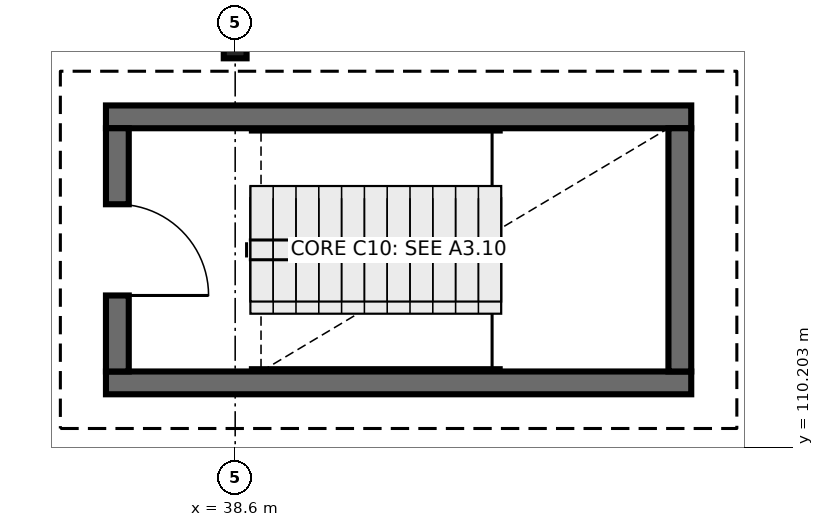
"""IFC4 building model, lengths in metres.
Left out: names, types, materials, properties, quantities, classifications, styles, units other than length and angle.
Written with IfcOpenShell. Run it as: python <this file> out.ifc"""

import sys

from ifc_helpers import new_model, si_unit, direction, frame, frame_2d, origin, origin_2d, place, context, subcontext, project, spatial, rectangle, i_section, extrude, element, fill, save


model = new_model("IFC4")
c1 = context("Model", 3, precision=1e-05, world=origin(), true_north=direction((0.0, 1.0)))
c2 = subcontext(c1, "Body", "Model", "MODEL_VIEW")
j1 = project(units=[si_unit("LENGTHUNIT", "METRE"), si_unit("PLANEANGLEUNIT", "RADIAN")], contexts=[c1])
p1 = place(None, origin())
s1 = spatial("IfcSite", under=j1, at=p1, CompositionType="ELEMENT")
p2 = place(p1, origin())
s2 = spatial("IfcBuilding", under=s1, at=p2, CompositionType="ELEMENT")
p3 = place(p2, frame((0.0, 0.0, 13.8)))
s3 = spatial("IfcBuildingStorey", under=s2, at=p3, CompositionType="ELEMENT", Elevation=13.8)
p4 = place(p3, frame((38.6, 115.5, 0.0), z_axis=(0.0, 0.0, 1.0), x_axis=(1.0, 0.0, 0.0)))
e1 = element("IfcColumn", 1, at=p4, inside=s3, PredefinedType="COLUMN", context=c2, shape_type="SweptSolid", body=[
    extrude(i_section(OverallWidth=0.3, OverallDepth=0.36, WebThickness=0.012, FlangeThickness=0.022, FilletRadius=0.027, at=origin_2d()), origin(), (0.0, 0.0, 1.0), 4.5),
])
for number, where, z_axis, x_axis in (
    (2, (36.9, 111.05, 0.0), (0.0, 0.0, 1.0), (1.0, 0.0, 0.0)),
    (3, (44.6, 114.55, 0.0), (0.0, 0.0, 1.0), (-1.0, 0.0, 0.0)),
):
    element("IfcWall", number, at=place(p3, frame(where, z_axis=z_axis, x_axis=x_axis)), inside=s3, PredefinedType="SHEAR", context=c2, shape_type="SweptSolid", body=[
        extrude(rectangle(XDim=7.7, YDim=0.3, at=frame_2d((3.85, 0.0))), origin(), (0.0, 0.0, 1.0), 4.5),
    ])
p5 = place(p3, frame((37.05, 114.4, 0.0), z_axis=(0.0, 0.0, 1.0), x_axis=(0.0, -1.0, 0.0)))
e4 = element("IfcWall", 4, at=p5, inside=s3, PredefinedType="SHEAR", context=c2, shape_type="SweptSolid", body=[
    extrude(rectangle(XDim=3.2, YDim=0.3, at=frame_2d((1.6, 0.0))), origin(), (0.0, 0.0, 1.0), 4.5),
])
p6 = place(p5, frame((1.0, 0.0, 0.0)))
e5 = element("IfcOpeningElement", 5, at=p6, cuts=e4, PredefinedType="OPENING", context=c2, shape_type="SweptSolid", body=[
    extrude(rectangle(XDim=1.2, YDim=2.15, at=frame_2d((0.6, 1.075))), frame((0.0, 0.16, 0.0), z_axis=(0.0, -1.0, 0.0), x_axis=(1.0, 0.0, 0.0)), (0.0, 0.0, 1.0), 0.32),
])
p7 = place(p3, frame((44.45, 111.2, 0.0), z_axis=(0.0, 0.0, 1.0), x_axis=(0.0, 1.0, 0.0)))
e6 = element("IfcWall", 6, at=p7, inside=s3, PredefinedType="SHEAR", context=c2, shape_type="SweptSolid", body=[
    extrude(rectangle(XDim=3.2, YDim=0.3, at=frame_2d((1.6, 0.0))), origin(), (0.0, 0.0, 1.0), 4.5),
])
p8 = place(p6, origin())
e7 = element("IfcDoor", 7, at=p8, inside=s3, OperationType="SINGLE_SWING_RIGHT", PredefinedType="DOOR", context=c2, shape_type="SweptSolid", body=[
    extrude(rectangle(XDim=1.2, YDim=2.15, at=frame_2d((0.6, 1.075))), frame((0.0, 0.025, 0.0), z_axis=(0.0, -1.0, 0.0), x_axis=(1.0, 0.0, 0.0)), (0.0, 0.0, 1.0), 0.05),
])
fill(e5, e7)
save(model, sys.argv[1])
